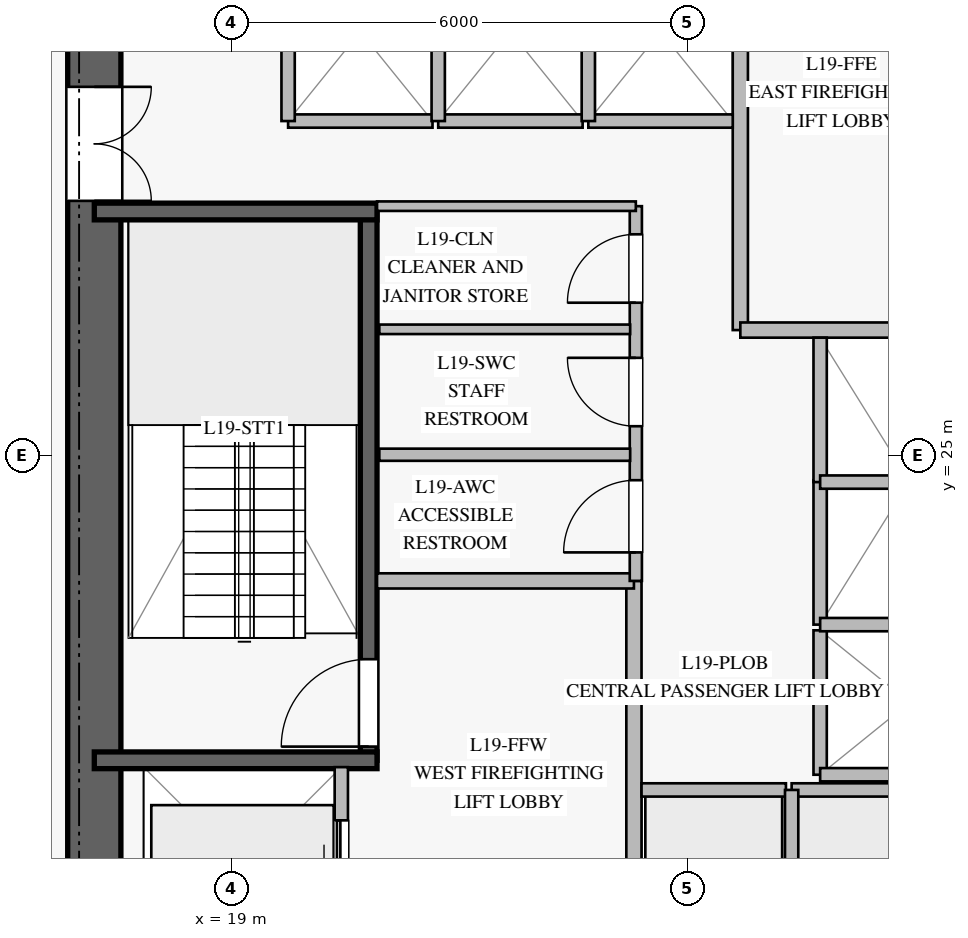
"""IFC4 building model, lengths in metres.
Left out: names, types, materials, properties, quantities, classifications, styles, units other than length and angle.
Written with IfcOpenShell. Run it as: python <this file> out.ifc"""

import sys

from ifc_helpers import new_model, si_unit, direction, frame, frame_2d, origin, place, context, subcontext, project, spatial, rectangle, extrude, element, fill, save


model = new_model("IFC4")
c1 = context("Model", 3, precision=1e-05, world=origin(), true_north=direction((0.0, 1.0)))
c2 = subcontext(c1, "Body", "Model", "MODEL_VIEW")
j1 = project(units=[si_unit("LENGTHUNIT", "METRE"), si_unit("PLANEANGLEUNIT", "RADIAN")], contexts=[c1])
p1 = place(None, origin())
s1 = spatial("IfcSite", under=j1, at=p1, CompositionType="ELEMENT")
p2 = place(p1, origin())
s2 = spatial("IfcBuilding", under=s1, at=p2, CompositionType="ELEMENT")
p3 = place(p2, frame((0.0, 0.0, 80.0)))
s3 = spatial("IfcBuildingStorey", under=s2, at=p3, CompositionType="ELEMENT", Elevation=80.0)
p4 = place(p3, frame((17.2, 31.85, 0.0), z_axis=(0.0, 0.0, 1.0), x_axis=(0.0, -1.0, 0.0)))
e1 = element("IfcWall", 1, at=p4, inside=s3, PredefinedType="SHEAR", context=c2, shape_type="SweptSolid", body=[
    extrude(rectangle(XDim=13.7, YDim=0.7, at=frame_2d((6.85, 0.0))), origin(), (0.0, 0.0, 1.0), 3.76),
])
p5 = place(p4, frame((2.0, 0.0, 0.0)))
e2 = element("IfcOpeningElement", 2, at=p5, cuts=e1, PredefinedType="OPENING", context=c2, shape_type="SweptSolid", body=[
    extrude(rectangle(XDim=1.5, YDim=2.2, at=frame_2d((0.75, 1.1))), frame((0.0, 0.36, 0.0), z_axis=(0.0, -1.0, 0.0), x_axis=(1.0, 0.0, 0.0)), (0.0, 0.0, 1.0), 0.72),
])
p6 = place(p3, frame((20.81, 20.99, 0.0), z_axis=(0.0, 0.0, 1.0), x_axis=(0.0, 1.0, 0.0)))
e3 = element("IfcWall", 3, at=p6, inside=s3, PredefinedType="SOLIDWALL", context=c2, shape_type="SweptSolid", body=[
    extrude(rectangle(XDim=7.22, YDim=0.22, at=frame_2d((3.61, 0.0))), origin(), (0.0, 0.0, 1.0), 3.76),
])
p7 = place(p6, frame((0.18, 0.0, 0.0)))
e4 = element("IfcOpeningElement", 4, at=p7, cuts=e3, PredefinedType="OPENING", context=c2, shape_type="SweptSolid", body=[
    extrude(rectangle(XDim=1.15, YDim=2.2, at=frame_2d((0.575, 1.1))), frame((0.0, 0.12, 0.0), z_axis=(0.0, -1.0, 0.0), x_axis=(1.0, 0.0, 0.0)), (0.0, 0.0, 1.0), 0.24),
])
for number, where, z_axis, x_axis in (
    (5, (17.2, 20.99, 0.0), (0.0, 0.0, 1.0), (1.0, 0.0, 0.0)),
    (6, (17.2, 28.21, 0.0), (0.0, 0.0, 1.0), (1.0, 0.0, 0.0)),
):
    element("IfcWall", number, at=place(p3, frame(where, z_axis=z_axis, x_axis=x_axis)), inside=s3, PredefinedType="SOLIDWALL", context=c2, shape_type="SweptSolid", body=[
        extrude(rectangle(XDim=3.72, YDim=0.22, at=frame_2d((1.86, 0.0))), origin(), (0.0, 0.0, 1.0), 3.76),
    ])
p8 = place(p3, frame((24.3, 18.2, 0.0), z_axis=(0.0, 0.0, 1.0), x_axis=(0.0, 1.0, 0.0)))
e7 = element("IfcWall", 7, at=p8, inside=s3, PredefinedType="PARTITIONING", context=c2, shape_type="SweptSolid", body=[
    extrude(rectangle(XDim=5.15, YDim=0.2, at=frame_2d((2.575, 0.0))), origin(), (0.0, 0.0, 1.0), 3.76),
])
p9 = place(p3, frame((20.92, 23.35, 0.0), z_axis=(0.0, 0.0, 1.0), x_axis=(1.0, 0.0, 0.0)))
e8 = element("IfcWall", 8, at=p9, inside=s3, PredefinedType="PARTITIONING", context=c2, shape_type="SweptSolid", body=[
    extrude(rectangle(XDim=3.38, YDim=0.2, at=frame_2d((1.69, 0.0))), origin(), (0.0, 0.0, 1.0), 3.76),
])
p10 = place(p3, frame((25.7, 26.65, 0.0), z_axis=(0.0, 0.0, 1.0), x_axis=(0.0, 1.0, 0.0)))
e9 = element("IfcWall", 9, at=p10, inside=s3, PredefinedType="PARTITIONING", context=c2, shape_type="SweptSolid", body=[
    extrude(rectangle(XDim=5.15, YDim=0.2, at=frame_2d((2.575, 0.0))), origin(), (0.0, 0.0, 1.0), 3.76),
])
p11 = place(p3, frame((25.7, 26.65, 0.0), z_axis=(0.0, 0.0, 1.0), x_axis=(1.0, 0.0, 0.0)))
e10 = element("IfcWall", 10, at=p11, inside=s3, PredefinedType="PARTITIONING", context=c2, shape_type="SweptSolid", body=[
    extrude(rectangle(XDim=3.38, YDim=0.2, at=frame_2d((1.69, 0.0))), origin(), (0.0, 0.0, 1.0), 3.76),
])
p12 = place(p3, frame((24.325, 23.35, 0.0), z_axis=(0.0, 0.0, 1.0), x_axis=(0.0, 1.0, 0.0)))
e11 = element("IfcWall", 11, at=p12, inside=s3, PredefinedType="PLUMBINGWALL", context=c2, shape_type="SweptSolid", body=[
    extrude(rectangle(XDim=4.93, YDim=0.16, at=frame_2d((2.465, 0.0))), origin(), (0.0, 0.0, 1.0), 3.76),
])
p13 = place(p12, frame((0.375, 0.0, 0.0)))
e12 = element("IfcOpeningElement", 12, at=p13, cuts=e11, PredefinedType="OPENING", context=c2, shape_type="SweptSolid", body=[
    extrude(rectangle(XDim=0.95, YDim=2.1, at=frame_2d((0.475, 1.05))), frame((0.0, 0.09, 0.0), z_axis=(0.0, -1.0, 0.0), x_axis=(1.0, 0.0, 0.0)), (0.0, 0.0, 1.0), 0.18),
])
p14 = place(p12, frame((2.035, 0.0, 0.0)))
e13 = element("IfcOpeningElement", 13, at=p14, cuts=e11, PredefinedType="OPENING", context=c2, shape_type="SweptSolid", body=[
    extrude(rectangle(XDim=0.9, YDim=2.1, at=frame_2d((0.45, 1.05))), frame((0.0, 0.09, 0.0), z_axis=(0.0, -1.0, 0.0), x_axis=(1.0, 0.0, 0.0)), (0.0, 0.0, 1.0), 0.18),
])
p15 = place(p12, frame((3.66, 0.0, 0.0)))
e14 = element("IfcOpeningElement", 14, at=p15, cuts=e11, PredefinedType="OPENING", context=c2, shape_type="SweptSolid", body=[
    extrude(rectangle(XDim=0.9, YDim=2.1, at=frame_2d((0.45, 1.05))), frame((0.0, 0.09, 0.0), z_axis=(0.0, -1.0, 0.0), x_axis=(1.0, 0.0, 0.0)), (0.0, 0.0, 1.0), 0.18),
])
p16 = place(p3, frame((20.92, 28.28, 0.0), z_axis=(0.0, 0.0, 1.0), x_axis=(1.0, 0.0, 0.0)))
e15 = element("IfcWall", 15, at=p16, inside=s3, PredefinedType="PARTITIONING", context=c2, shape_type="SweptSolid", body=[
    extrude(rectangle(XDim=3.405, YDim=0.125, at=frame_2d((1.703, 0.0))), origin(), (0.0, 0.0, 1.0), 3.76),
])
p17 = place(p3, frame((20.95, 25.01, 0.0), z_axis=(0.0, 0.0, 1.0), x_axis=(1.0, 0.0, 0.0)))
e16 = element("IfcWall", 16, at=p17, inside=s3, PredefinedType="PLUMBINGWALL", context=c2, shape_type="SweptSolid", body=[
    extrude(rectangle(XDim=3.3, YDim=0.16, at=frame_2d((1.65, 0.0))), origin(), (0.0, 0.0, 1.0), 3.76),
])
p18 = place(p3, frame((20.95, 26.66, 0.0), z_axis=(0.0, 0.0, 1.0), x_axis=(1.0, 0.0, 0.0)))
e17 = element("IfcWall", 17, at=p18, inside=s3, PredefinedType="PARTITIONING", context=c2, shape_type="SweptSolid", body=[
    extrude(rectangle(XDim=3.3, YDim=0.125, at=frame_2d((1.65, 0.0))), origin(), (0.0, 0.0, 1.0), 3.76),
])
p19 = place(p3, frame((24.4, 20.6, 0.0), z_axis=(0.0, 0.0, 1.0), x_axis=(1.0, 0.0, 0.0)))
e18 = element("IfcWall", 18, at=p19, inside=s3, PredefinedType="PARTITIONING", context=c2, shape_type="SweptSolid", body=[
    extrude(rectangle(XDim=1.9, YDim=0.175, at=frame_2d((0.95, 0.0))), origin(), (0.0, 0.0, 1.0), 3.76),
])
p20 = place(p3, frame((26.375, 20.6, 0.0), z_axis=(0.0, 0.0, 1.0), x_axis=(1.0, 0.0, 0.0)))
e19 = element("IfcWall", 19, at=p20, inside=s3, PredefinedType="PARTITIONING", context=c2, shape_type="SweptSolid", body=[
    extrude(rectangle(XDim=1.9, YDim=0.175, at=frame_2d((0.95, 0.0))), origin(), (0.0, 0.0, 1.0), 3.76),
])
p21 = place(p3, frame((26.375, 18.25, 0.0), z_axis=(0.0, 0.0, 1.0), x_axis=(0.0, 1.0, 0.0)))
e20 = element("IfcWall", 20, at=p21, inside=s3, PredefinedType="PARTITIONING", context=c2, shape_type="SweptSolid", body=[
    extrude(rectangle(XDim=2.35, YDim=0.175, at=frame_2d((1.175, 0.0))), origin(), (0.0, 0.0, 1.0), 3.76),
])
p22 = place(p3, frame((19.75, 29.4, 0.0), z_axis=(0.0, 0.0, 1.0), x_axis=(1.0, 0.0, 0.0)))
e21 = element("IfcWall", 21, at=p22, inside=s3, PredefinedType="PARTITIONING", context=c2, shape_type="SweptSolid", body=[
    extrude(rectangle(XDim=1.9, YDim=0.175, at=frame_2d((0.95, 0.0))), origin(), (0.0, 0.0, 1.0), 3.76),
])
p23 = place(p3, frame((19.75, 29.4, 0.0), z_axis=(0.0, 0.0, 1.0), x_axis=(0.0, 1.0, 0.0)))
e22 = element("IfcWall", 22, at=p23, inside=s3, PredefinedType="PARTITIONING", context=c2, shape_type="SweptSolid", body=[
    extrude(rectangle(XDim=2.35, YDim=0.175, at=frame_2d((1.175, 0.0))), origin(), (0.0, 0.0, 1.0), 3.76),
])
p24 = place(p3, frame((21.725, 29.4, 0.0), z_axis=(0.0, 0.0, 1.0), x_axis=(1.0, 0.0, 0.0)))
e23 = element("IfcWall", 23, at=p24, inside=s3, PredefinedType="PARTITIONING", context=c2, shape_type="SweptSolid", body=[
    extrude(rectangle(XDim=1.9, YDim=0.175, at=frame_2d((0.95, 0.0))), origin(), (0.0, 0.0, 1.0), 3.76),
])
p25 = place(p3, frame((21.725, 29.4, 0.0), z_axis=(0.0, 0.0, 1.0), x_axis=(0.0, 1.0, 0.0)))
e24 = element("IfcWall", 24, at=p25, inside=s3, PredefinedType="PARTITIONING", context=c2, shape_type="SweptSolid", body=[
    extrude(rectangle(XDim=2.35, YDim=0.175, at=frame_2d((1.175, 0.0))), origin(), (0.0, 0.0, 1.0), 3.76),
])
p26 = place(p3, frame((23.7, 29.4, 0.0), z_axis=(0.0, 0.0, 1.0), x_axis=(1.0, 0.0, 0.0)))
e25 = element("IfcWall", 25, at=p26, inside=s3, PredefinedType="PARTITIONING", context=c2, shape_type="SweptSolid", body=[
    extrude(rectangle(XDim=1.9, YDim=0.175, at=frame_2d((0.95, 0.0))), origin(), (0.0, 0.0, 1.0), 3.76),
])
p27 = place(p3, frame((23.7, 29.4, 0.0), z_axis=(0.0, 0.0, 1.0), x_axis=(0.0, 1.0, 0.0)))
e26 = element("IfcWall", 26, at=p27, inside=s3, PredefinedType="PARTITIONING", context=c2, shape_type="SweptSolid", body=[
    extrude(rectangle(XDim=2.35, YDim=0.175, at=frame_2d((1.175, 0.0))), origin(), (0.0, 0.0, 1.0), 3.76),
])
p28 = place(p3, frame((26.75, 20.8, 0.0), z_axis=(0.0, 0.0, 1.0), x_axis=(0.0, 1.0, 0.0)))
e27 = element("IfcWall", 27, at=p28, inside=s3, PredefinedType="PARTITIONING", context=c2, shape_type="SweptSolid", body=[
    extrude(rectangle(XDim=1.9, YDim=0.175, at=frame_2d((0.95, 0.0))), origin(), (0.0, 0.0, 1.0), 3.76),
])
p29 = place(p3, frame((26.75, 20.8, 0.0), z_axis=(0.0, 0.0, 1.0), x_axis=(1.0, 0.0, 0.0)))
e28 = element("IfcWall", 28, at=p29, inside=s3, PredefinedType="PARTITIONING", context=c2, shape_type="SweptSolid", body=[
    extrude(rectangle(XDim=2.35, YDim=0.175, at=frame_2d((1.175, 0.0))), origin(), (0.0, 0.0, 1.0), 3.76),
])
p30 = place(p3, frame((26.75, 22.775, 0.0), z_axis=(0.0, 0.0, 1.0), x_axis=(0.0, 1.0, 0.0)))
e29 = element("IfcWall", 29, at=p30, inside=s3, PredefinedType="PARTITIONING", context=c2, shape_type="SweptSolid", body=[
    extrude(rectangle(XDim=1.9, YDim=0.175, at=frame_2d((0.95, 0.0))), origin(), (0.0, 0.0, 1.0), 3.76),
])
p31 = place(p3, frame((26.75, 22.775, 0.0), z_axis=(0.0, 0.0, 1.0), x_axis=(1.0, 0.0, 0.0)))
e30 = element("IfcWall", 30, at=p31, inside=s3, PredefinedType="PARTITIONING", context=c2, shape_type="SweptSolid", body=[
    extrude(rectangle(XDim=2.35, YDim=0.175, at=frame_2d((1.175, 0.0))), origin(), (0.0, 0.0, 1.0), 3.76),
])
p32 = place(p3, frame((26.75, 24.65, 0.0), z_axis=(0.0, 0.0, 1.0), x_axis=(0.0, 1.0, 0.0)))
e31 = element("IfcWall", 31, at=p32, inside=s3, PredefinedType="PARTITIONING", context=c2, shape_type="SweptSolid", body=[
    extrude(rectangle(XDim=1.9, YDim=0.175, at=frame_2d((0.95, 0.0))), origin(), (0.0, 0.0, 1.0), 3.76),
])
p33 = place(p3, frame((26.75, 24.65, 0.0), z_axis=(0.0, 0.0, 1.0), x_axis=(1.0, 0.0, 0.0)))
e32 = element("IfcWall", 32, at=p33, inside=s3, PredefinedType="PARTITIONING", context=c2, shape_type="SweptSolid", body=[
    extrude(rectangle(XDim=2.35, YDim=0.175, at=frame_2d((1.175, 0.0))), origin(), (0.0, 0.0, 1.0), 3.76),
])
p34 = place(p3, frame((20.45, 18.3, 0.0), z_axis=(0.0, 0.0, 1.0), x_axis=(0.0, 1.0, 0.0)))
e33 = element("IfcWall", 33, at=p34, inside=s3, PredefinedType="PARTITIONING", context=c2, shape_type="SweptSolid", body=[
    extrude(rectangle(XDim=2.6, YDim=0.175, at=frame_2d((1.3, 0.0))), origin(), (0.0, 0.0, 1.0), 3.76),
])
p35 = place(p34, frame((0.7, 0.0, 0.0)))
e34 = element("IfcOpeningElement", 34, at=p35, cuts=e33, PredefinedType="OPENING", context=c2, shape_type="SweptSolid", body=[
    extrude(rectangle(XDim=1.2, YDim=2.2, at=frame_2d((0.6, 1.1))), frame((0.0, 0.098, 0.0), z_axis=(0.0, -1.0, 0.0), x_axis=(1.0, 0.0, 0.0)), (0.0, 0.0, 1.0), 0.195),
])
p36 = place(p7, origin())
e35 = element("IfcDoor", 35, at=p36, inside=s3, OperationType="SINGLE_SWING_LEFT", PredefinedType="DOOR", context=c2, shape_type="SweptSolid", body=[
    extrude(rectangle(XDim=1.15, YDim=2.2, at=frame_2d((0.575, 1.1))), frame((0.0, 0.025, 0.0), z_axis=(0.0, -1.0, 0.0), x_axis=(1.0, 0.0, 0.0)), (0.0, 0.0, 1.0), 0.05),
])
fill(e4, e35)
p37 = place(p5, origin())
e36 = element("IfcDoor", 36, at=p37, inside=s3, OperationType="DOUBLE_DOOR_SINGLE_SWING", PredefinedType="DOOR", context=c2, shape_type="SweptSolid", body=[
    extrude(rectangle(XDim=1.5, YDim=2.2, at=frame_2d((0.75, 1.1))), frame((0.0, 0.025, 0.0), z_axis=(0.0, -1.0, 0.0), x_axis=(1.0, 0.0, 0.0)), (0.0, 0.0, 1.0), 0.05),
])
fill(e2, e36)
p38 = place(p13, origin())
e37 = element("IfcDoor", 37, at=p38, inside=s3, OperationType="SINGLE_SWING_LEFT", PredefinedType="DOOR", context=c2, shape_type="SweptSolid", body=[
    extrude(rectangle(XDim=0.95, YDim=2.1, at=frame_2d((0.475, 1.05))), frame((0.0, 0.025, 0.0), z_axis=(0.0, -1.0, 0.0), x_axis=(1.0, 0.0, 0.0)), (0.0, 0.0, 1.0), 0.05),
])
fill(e12, e37)
p39 = place(p14, origin())
e38 = element("IfcDoor", 38, at=p39, inside=s3, OperationType="SINGLE_SWING_RIGHT", PredefinedType="DOOR", context=c2, shape_type="SweptSolid", body=[
    extrude(rectangle(XDim=0.9, YDim=2.1, at=frame_2d((0.45, 1.05))), frame((0.0, 0.025, 0.0), z_axis=(0.0, -1.0, 0.0), x_axis=(1.0, 0.0, 0.0)), (0.0, 0.0, 1.0), 0.05),
])
fill(e13, e38)
p40 = place(p15, origin())
e39 = element("IfcDoor", 39, at=p40, inside=s3, OperationType="SINGLE_SWING_LEFT", PredefinedType="DOOR", context=c2, shape_type="SweptSolid", body=[
    extrude(rectangle(XDim=0.9, YDim=2.1, at=frame_2d((0.45, 1.05))), frame((0.0, 0.025, 0.0), z_axis=(0.0, -1.0, 0.0), x_axis=(1.0, 0.0, 0.0)), (0.0, 0.0, 1.0), 0.05),
])
fill(e14, e39)
p41 = place(p35, origin())
e40 = element("IfcDoor", 40, at=p41, inside=s3, OperationType="DOUBLE_DOOR_SLIDING", PredefinedType="DOOR", context=c2, shape_type="SweptSolid", body=[
    extrude(rectangle(XDim=1.2, YDim=2.2, at=frame_2d((0.6, 1.1))), frame((0.0, 0.025, 0.0), z_axis=(0.0, -1.0, 0.0), x_axis=(1.0, 0.0, 0.0)), (0.0, 0.0, 1.0), 0.05),
])
fill(e34, e40)
save(model, sys.argv[1])
